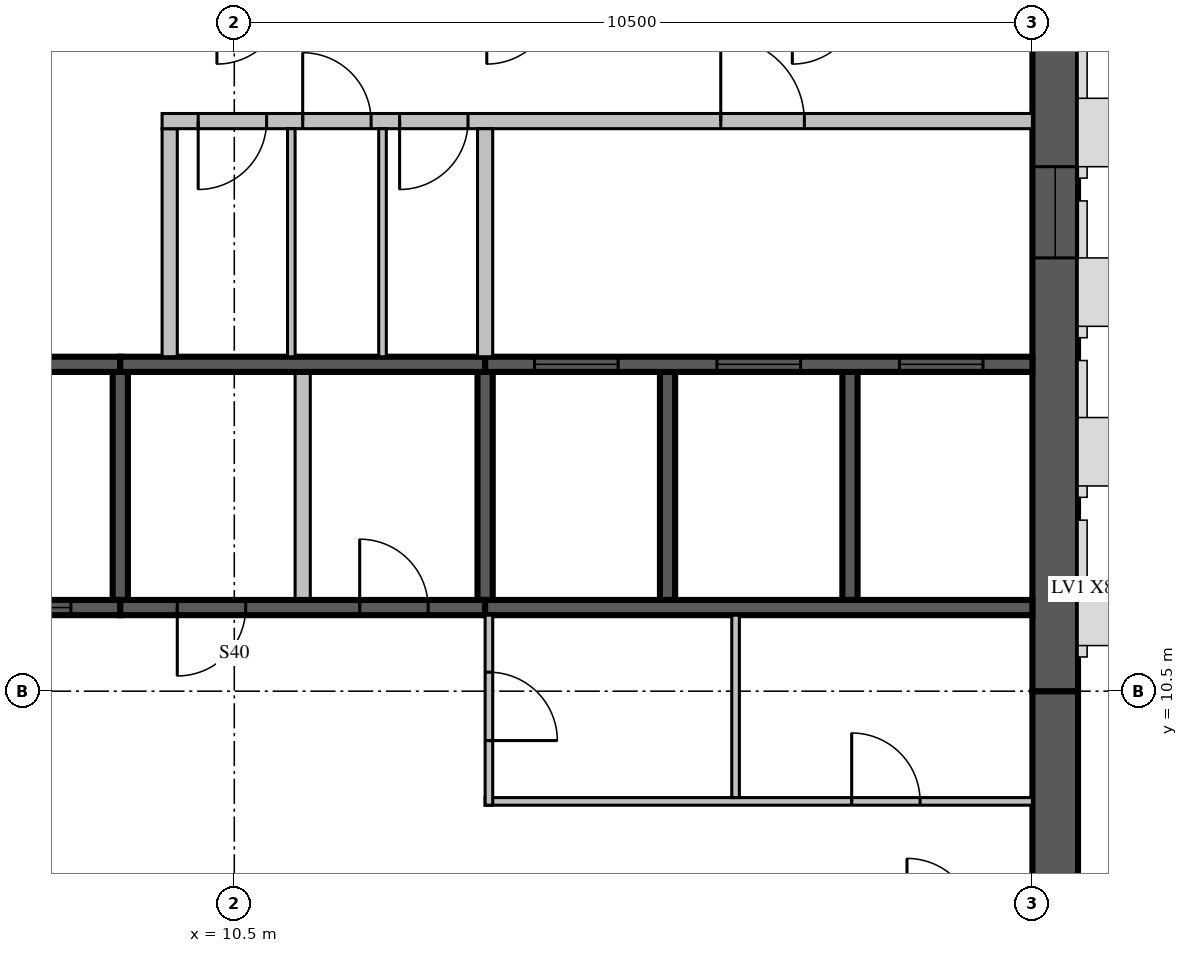
"""IFC4 building model, lengths in metres.
Left out: names, types, materials, properties, quantities, classifications, styles, units other than length and angle.
Written with IfcOpenShell. Run it as: python <this file> out.ifc"""

import sys

from ifc_helpers import new_model, si_unit, direction, frame, frame_2d, origin, place, context, subcontext, project, spatial, rectangle, extrude, source, transform, mapped, element, fill, save


model = new_model("IFC4")
c1 = context("Model", 3, precision=1e-05, world=origin(), true_north=direction((0.0, 1.0)))
c2 = subcontext(c1, "Body", "Model", "MODEL_VIEW")
j1 = project(units=[si_unit("LENGTHUNIT", "METRE"), si_unit("PLANEANGLEUNIT", "RADIAN")], contexts=[c1])
p1 = place(None, origin())
s1 = spatial("IfcSite", under=j1, at=p1, CompositionType="ELEMENT")
p2 = place(p1, origin())
s2 = spatial("IfcBuilding", under=s1, at=p2, CompositionType="ELEMENT")
p3 = place(p2, frame((0.0, 0.0, 298.5)))
s3 = spatial("IfcBuildingStorey", under=s2, at=p3, CompositionType="ELEMENT", Elevation=298.5)
m1 = source(origin(), c2, "Body", "SweptSolid", [
    extrude(rectangle(XDim=6.3, YDim=0.6, at=frame_2d((3.15, 0.0))), origin(), (0.0, 0.0, 1.0), 3.5),
])
p4 = place(p3, frame((21.3, 4.2, 0.0), z_axis=(0.0, 0.0, 1.0), x_axis=(0.0, 1.0, 0.0)))
e1 = element("IfcWall", 1, at=p4, inside=s3, PredefinedType="SHEAR", context=c2, shape_type="MappedRepresentation", body=[
    mapped(m1, transform((0.0, 0.0, 0.0), scale=1.0)),
])
m2 = source(origin(), c2, "Body", "SweptSolid", [
    extrude(rectangle(XDim=10.5, YDim=0.6, at=frame_2d((5.25, 0.0))), origin(), (0.0, 0.0, 1.0), 3.5),
])
p5 = place(p3, frame((21.3, 10.5, 0.0), z_axis=(0.0, 0.0, 1.0), x_axis=(0.0, 1.0, 0.0)))
e2 = element("IfcWall", 2, at=p5, inside=s3, PredefinedType="SHEAR", context=c2, shape_type="MappedRepresentation", body=[
    mapped(m2, transform((0.0, 0.0, 0.0), scale=1.0)),
])
m3 = source(origin(), c2, "Body", "SweptSolid", [
    extrude(rectangle(XDim=1.2, YDim=2.4, at=frame_2d((0.6, 1.2))), frame((0.0, 0.31, 0.0), z_axis=(0.0, -1.0, 0.0), x_axis=(1.0, 0.0, 0.0)), (0.0, 0.0, 1.0), 0.62),
])
p6 = place(p5, frame((5.7, 0.0, 0.6)))
e3 = element("IfcOpeningElement", 3, at=p6, cuts=e2, PredefinedType="OPENING", context=c2, shape_type="MappedRepresentation", body=[
    mapped(m3, transform((0.0, 0.0, 0.0), scale=1.0)),
])
m4 = source(origin(), c2, "Body", "SweptSolid", [
    extrude(rectangle(XDim=3.0, YDim=0.2, at=frame_2d((1.5, 0.0))), origin(), (0.0, 0.0, 1.0), 3.1),
])
for number, where, z_axis, x_axis in (
    (4, (9.0, 11.7, 0.0), (0.0, 0.0, 1.0), (0.0, 1.0, 0.0)),
    (5, (13.8, 11.7, 0.0), (0.0, 0.0, 1.0), (0.0, 1.0, 0.0)),
):
    element("IfcWall", number, at=place(p3, frame(where, z_axis=z_axis, x_axis=x_axis)), inside=s3, PredefinedType="SOLIDWALL", context=c2, shape_type="MappedRepresentation", body=[
        mapped(m4, transform((0.0, 0.0, 0.0), scale=1.0)),
    ])
m5 = source(origin(), c2, "Body", "SweptSolid", [
    extrude(rectangle(XDim=3.0, YDim=0.2, at=frame_2d((1.5, 0.0))), origin(), (0.0, 0.0, 1.0), 3.5),
])
for number, where, z_axis, x_axis in (
    (6, (16.2, 11.7, 0.0), (0.0, 0.0, 1.0), (0.0, 1.0, 0.0)),
    (7, (18.6, 11.7, 0.0), (0.0, 0.0, 1.0), (0.0, 1.0, 0.0)),
):
    element("IfcWall", number, at=place(p3, frame(where, z_axis=z_axis, x_axis=x_axis)), inside=s3, PredefinedType="SOLIDWALL", context=c2, shape_type="MappedRepresentation", body=[
        mapped(m5, transform((0.0, 0.0, 0.0), scale=1.0)),
    ])
m6 = source(origin(), c2, "Body", "SweptSolid", [
    extrude(rectangle(XDim=3.0, YDim=0.2, at=frame_2d((1.5, 0.0))), origin(), (0.0, 0.0, 1.0), 3.1),
])
p7 = place(p3, frame((11.4, 11.7, 0.0), z_axis=(0.0, 0.0, 1.0), x_axis=(0.0, 1.0, 0.0)))
e8 = element("IfcWall", 8, at=p7, inside=s3, PredefinedType="PARTITIONING", context=c2, shape_type="MappedRepresentation", body=[
    mapped(m6, transform((0.0, 0.0, 0.0), scale=1.0)),
])
m7 = source(origin(), c2, "Body", "SweptSolid", [
    extrude(rectangle(XDim=4.8, YDim=0.2, at=frame_2d((2.4, 0.0))), origin(), (0.0, 0.0, 1.0), 3.5),
])
p8 = place(p3, frame((4.2, 11.6, 0.0), z_axis=(0.0, 0.0, 1.0), x_axis=(1.0, 0.0, 0.0)))
e9 = element("IfcWall", 9, at=p8, inside=s3, PredefinedType="SOLIDWALL", context=c2, shape_type="MappedRepresentation", body=[
    mapped(m7, transform((0.0, 0.0, 0.0), scale=1.0)),
])
m8 = source(origin(), c2, "Body", "SweptSolid", [
    extrude(rectangle(XDim=1.1, YDim=2.1, at=frame_2d((0.55, 1.05))), frame((0.0, 0.11, 0.0), z_axis=(0.0, -1.0, 0.0), x_axis=(1.0, 0.0, 0.0)), (0.0, 0.0, 1.0), 0.22),
])
p9 = place(p8, frame((0.65, 0.0, 0.0)))
e10 = element("IfcOpeningElement", 10, at=p9, cuts=e9, PredefinedType="OPENING", context=c2, shape_type="MappedRepresentation", body=[
    mapped(m8, transform((0.0, 0.0, 0.0), scale=1.0)),
])
p10 = place(p8, frame((3.05, 0.0, 0.0)))
e11 = element("IfcOpeningElement", 11, at=p10, cuts=e9, PredefinedType="OPENING", context=c2, shape_type="MappedRepresentation", body=[
    mapped(m8, transform((0.0, 0.0, 0.0), scale=1.0)),
])
m9 = source(origin(), c2, "Body", "SweptSolid", [
    extrude(rectangle(XDim=4.8, YDim=0.2, at=frame_2d((2.4, 0.0))), origin(), (0.0, 0.0, 1.0), 3.1),
])
p11 = place(p3, frame((9.0, 11.6, 0.0), z_axis=(0.0, 0.0, 1.0), x_axis=(1.0, 0.0, 0.0)))
e12 = element("IfcWall", 12, at=p11, inside=s3, PredefinedType="SOLIDWALL", context=c2, shape_type="MappedRepresentation", body=[
    mapped(m9, transform((0.0, 0.0, 0.0), scale=1.0)),
])
m10 = source(origin(), c2, "Body", "SweptSolid", [
    extrude(rectangle(XDim=0.9, YDim=2.1, at=frame_2d((0.45, 1.05))), frame((0.0, 0.11, 0.0), z_axis=(0.0, -1.0, 0.0), x_axis=(1.0, 0.0, 0.0)), (0.0, 0.0, 1.0), 0.22),
])
p12 = place(p11, frame((0.75, 0.0, 0.0)))
e13 = element("IfcOpeningElement", 13, at=p12, cuts=e12, PredefinedType="OPENING", context=c2, shape_type="MappedRepresentation", body=[
    mapped(m10, transform((0.0, 0.0, 0.0), scale=1.0)),
])
p13 = place(p11, frame((3.15, 0.0, 0.0)))
e14 = element("IfcOpeningElement", 14, at=p13, cuts=e12, PredefinedType="OPENING", context=c2, shape_type="MappedRepresentation", body=[
    mapped(m10, transform((0.0, 0.0, 0.0), scale=1.0)),
])
m11 = source(origin(), c2, "Body", "SweptSolid", [
    extrude(rectangle(XDim=7.2, YDim=0.2, at=frame_2d((3.6, 0.0))), origin(), (0.0, 0.0, 1.0), 3.5),
])
p14 = place(p3, frame((13.8, 11.6, 0.0), z_axis=(0.0, 0.0, 1.0), x_axis=(1.0, 0.0, 0.0)))
e15 = element("IfcWall", 15, at=p14, inside=s3, PredefinedType="SOLIDWALL", context=c2, shape_type="MappedRepresentation", body=[
    mapped(m11, transform((0.0, 0.0, 0.0), scale=1.0)),
])
p15 = place(p3, frame((4.2, 14.8, 0.0), z_axis=(0.0, 0.0, 1.0), x_axis=(1.0, 0.0, 0.0)))
e16 = element("IfcWall", 16, at=p15, inside=s3, PredefinedType="SOLIDWALL", context=c2, shape_type="MappedRepresentation", body=[
    mapped(m7, transform((0.0, 0.0, 0.0), scale=1.0)),
])
p16 = place(p3, frame((9.0, 14.8, 0.0), z_axis=(0.0, 0.0, 1.0), x_axis=(1.0, 0.0, 0.0)))
e17 = element("IfcWall", 17, at=p16, inside=s3, PredefinedType="SOLIDWALL", context=c2, shape_type="MappedRepresentation", body=[
    mapped(m9, transform((0.0, 0.0, 0.0), scale=1.0)),
])
p17 = place(p3, frame((13.8, 14.8, 0.0), z_axis=(0.0, 0.0, 1.0), x_axis=(1.0, 0.0, 0.0)))
e18 = element("IfcWall", 18, at=p17, inside=s3, PredefinedType="SOLIDWALL", context=c2, shape_type="MappedRepresentation", body=[
    mapped(m11, transform((0.0, 0.0, 0.0), scale=1.0)),
])
p18 = place(p17, frame((0.65, 0.0, 0.0)))
e19 = element("IfcOpeningElement", 19, at=p18, cuts=e18, PredefinedType="OPENING", context=c2, shape_type="MappedRepresentation", body=[
    mapped(m8, transform((0.0, 0.0, 0.0), scale=1.0)),
])
p19 = place(p17, frame((3.05, 0.0, 0.0)))
e20 = element("IfcOpeningElement", 20, at=p19, cuts=e18, PredefinedType="OPENING", context=c2, shape_type="MappedRepresentation", body=[
    mapped(m8, transform((0.0, 0.0, 0.0), scale=1.0)),
])
p20 = place(p17, frame((5.45, 0.0, 0.0)))
e21 = element("IfcOpeningElement", 21, at=p20, cuts=e18, PredefinedType="OPENING", context=c2, shape_type="MappedRepresentation", body=[
    mapped(m8, transform((0.0, 0.0, 0.0), scale=1.0)),
])
p21 = place(p3, frame((9.65, 14.9, 0.0), z_axis=(0.0, 0.0, 1.0), x_axis=(0.0, 1.0, 0.0)))
e22 = element("IfcWall", 22, at=p21, inside=s3, PredefinedType="PARTITIONING", context=c2, shape_type="MappedRepresentation", body=[
    mapped(m6, transform((0.0, 0.0, 0.0), scale=1.0)),
])
m12 = source(origin(), c2, "Body", "SweptSolid", [
    extrude(rectangle(XDim=11.45, YDim=0.2, at=frame_2d((5.725, 0.0))), origin(), (0.0, 0.0, 1.0), 3.1),
])
p22 = place(p3, frame((9.55, 18.0, 0.0), z_axis=(0.0, 0.0, 1.0), x_axis=(1.0, 0.0, 0.0)))
e23 = element("IfcWall", 23, at=p22, inside=s3, PredefinedType="PARTITIONING", context=c2, shape_type="MappedRepresentation", body=[
    mapped(m12, transform((0.0, 0.0, 0.0), scale=1.0)),
])
p23 = place(p22, frame((0.475, 0.0, 0.0)))
e24 = element("IfcOpeningElement", 24, at=p23, cuts=e23, PredefinedType="OPENING", context=c2, shape_type="MappedRepresentation", body=[
    mapped(m10, transform((0.0, 0.0, 0.0), scale=1.0)),
])
p24 = place(p22, frame((1.85, 0.0, 0.0)))
e25 = element("IfcOpeningElement", 25, at=p24, cuts=e23, PredefinedType="OPENING", context=c2, shape_type="MappedRepresentation", body=[
    mapped(m10, transform((0.0, 0.0, 0.0), scale=1.0)),
])
p25 = place(p22, frame((3.125, 0.0, 0.0)))
e26 = element("IfcOpeningElement", 26, at=p25, cuts=e23, PredefinedType="OPENING", context=c2, shape_type="MappedRepresentation", body=[
    mapped(m10, transform((0.0, 0.0, 0.0), scale=1.0)),
])
p26 = place(p22, frame((7.35, 0.0, 0.0)))
e27 = element("IfcOpeningElement", 27, at=p26, cuts=e23, PredefinedType="OPENING", context=c2, shape_type="MappedRepresentation", body=[
    mapped(m8, transform((0.0, 0.0, 0.0), scale=1.0)),
])
m13 = source(origin(), c2, "Body", "SweptSolid", [
    extrude(rectangle(XDim=7.2, YDim=0.1, at=frame_2d((3.6, 0.0))), origin(), (0.0, 0.0, 1.0), 3.1),
])
p27 = place(p3, frame((13.8, 9.05, 0.0), z_axis=(0.0, 0.0, 1.0), x_axis=(1.0, 0.0, 0.0)))
e28 = element("IfcWall", 28, at=p27, inside=s3, PredefinedType="PARTITIONING", context=c2, shape_type="MappedRepresentation", body=[
    mapped(m13, transform((0.0, 0.0, 0.0), scale=1.0)),
])
m14 = source(origin(), c2, "Body", "SweptSolid", [
    extrude(rectangle(XDim=0.9, YDim=2.1, at=frame_2d((0.45, 1.05))), frame((0.0, 0.06, 0.0), z_axis=(0.0, -1.0, 0.0), x_axis=(1.0, 0.0, 0.0)), (0.0, 0.0, 1.0), 0.12),
])
p28 = place(p27, frame((4.822, 0.0, 0.0)))
e29 = element("IfcOpeningElement", 29, at=p28, cuts=e28, PredefinedType="OPENING", context=c2, shape_type="MappedRepresentation", body=[
    mapped(m14, transform((0.0, 0.0, 0.0), scale=1.0)),
])
m15 = source(origin(), c2, "Body", "SweptSolid", [
    extrude(rectangle(XDim=2.5, YDim=0.1, at=frame_2d((1.25, 0.0))), origin(), (0.0, 0.0, 1.0), 3.1),
])
p29 = place(p3, frame((13.85, 9.0, 0.0), z_axis=(0.0, 0.0, 1.0), x_axis=(0.0, 1.0, 0.0)))
e30 = element("IfcWall", 30, at=p29, inside=s3, PredefinedType="PARTITIONING", context=c2, shape_type="MappedRepresentation", body=[
    mapped(m15, transform((0.0, 0.0, 0.0), scale=1.0)),
])
p30 = place(p29, frame((0.85, 0.0, 0.0)))
e31 = element("IfcOpeningElement", 31, at=p30, cuts=e30, PredefinedType="OPENING", context=c2, shape_type="MappedRepresentation", body=[
    mapped(m14, transform((0.0, 0.0, 0.0), scale=1.0)),
])
m16 = source(origin(), c2, "Body", "SweptSolid", [
    extrude(rectangle(XDim=2.4, YDim=0.1, at=frame_2d((1.2, 0.0))), origin(), (0.0, 0.0, 1.0), 3.1),
])
p31 = place(p3, frame((17.095, 9.1, 0.0), z_axis=(0.0, 0.0, 1.0), x_axis=(0.0, 1.0, 0.0)))
e32 = element("IfcWall", 32, at=p31, inside=s3, PredefinedType="PARTITIONING", context=c2, shape_type="MappedRepresentation", body=[
    mapped(m16, transform((0.0, 0.0, 0.0), scale=1.0)),
])
p32 = place(p3, frame((13.8, 14.9, 0.0), z_axis=(0.0, 0.0, 1.0), x_axis=(0.0, 1.0, 0.0)))
e33 = element("IfcWall", 33, at=p32, inside=s3, PredefinedType="PARTITIONING", context=c2, shape_type="MappedRepresentation", body=[
    mapped(m6, transform((0.0, 0.0, 0.0), scale=1.0)),
])
m17 = source(origin(), c2, "Body", "SweptSolid", [
    extrude(rectangle(XDim=3.0, YDim=0.1, at=frame_2d((1.5, 0.0))), origin(), (0.0, 0.0, 1.0), 3.1),
])
for number, where, z_axis, x_axis in (
    (34, (11.25, 14.9, 0.0), (0.0, 0.0, 1.0), (0.0, 1.0, 0.0)),
    (35, (12.45, 14.9, 0.0), (0.0, 0.0, 1.0), (0.0, 1.0, 0.0)),
):
    element("IfcWall", number, at=place(p3, frame(where, z_axis=z_axis, x_axis=x_axis)), inside=s3, PredefinedType="PARTITIONING", context=c2, shape_type="MappedRepresentation", body=[
        mapped(m17, transform((0.0, 0.0, 0.0), scale=1.0)),
    ])
m18 = source(origin(), c2, "Body", "SweptSolid", [
    extrude(rectangle(XDim=1.1, YDim=2.1, at=frame_2d((0.55, 1.05))), frame((0.0, 0.025, 0.0), z_axis=(0.0, -1.0, 0.0), x_axis=(1.0, 0.0, 0.0)), (0.0, 0.0, 1.0), 0.05),
])
p33 = place(p10, origin())
e36 = element("IfcDoor", 36, at=p33, inside=s3, OperationType="SLIDING_TO_LEFT", PredefinedType="DOOR", context=c2, shape_type="MappedRepresentation", body=[
    mapped(m18, transform((0.0, 0.0, 0.0), scale=1.0)),
])
fill(e11, e36)
m19 = source(origin(), c2, "Body", "SweptSolid", [
    extrude(rectangle(XDim=0.9, YDim=2.1, at=frame_2d((0.45, 1.05))), frame((0.0, 0.025, 0.0), z_axis=(0.0, -1.0, 0.0), x_axis=(1.0, 0.0, 0.0)), (0.0, 0.0, 1.0), 0.05),
])
p34 = place(p12, origin())
e37 = element("IfcDoor", 37, at=p34, inside=s3, OperationType="SINGLE_SWING_RIGHT", PredefinedType="DOOR", context=c2, shape_type="MappedRepresentation", body=[
    mapped(m19, transform((0.0, 0.0, 0.0), scale=1.0)),
])
fill(e13, e37)
p35 = place(p13, origin())
e38 = element("IfcDoor", 38, at=p35, inside=s3, OperationType="SINGLE_SWING_LEFT", PredefinedType="DOOR", context=c2, shape_type="MappedRepresentation", body=[
    mapped(m19, transform((0.0, 0.0, 0.0), scale=1.0)),
])
fill(e14, e38)
p36 = place(p18, origin())
e39 = element("IfcDoor", 39, at=p36, inside=s3, OperationType="SLIDING_TO_LEFT", PredefinedType="DOOR", context=c2, shape_type="MappedRepresentation", body=[
    mapped(m18, transform((0.0, 0.0, 0.0), scale=1.0)),
])
fill(e19, e39)
p37 = place(p19, origin())
e40 = element("IfcDoor", 40, at=p37, inside=s3, OperationType="SLIDING_TO_LEFT", PredefinedType="DOOR", context=c2, shape_type="MappedRepresentation", body=[
    mapped(m18, transform((0.0, 0.0, 0.0), scale=1.0)),
])
fill(e20, e40)
p38 = place(p20, origin())
e41 = element("IfcDoor", 41, at=p38, inside=s3, OperationType="SLIDING_TO_LEFT", PredefinedType="DOOR", context=c2, shape_type="MappedRepresentation", body=[
    mapped(m18, transform((0.0, 0.0, 0.0), scale=1.0)),
])
fill(e21, e41)
p39 = place(p23, origin())
e42 = element("IfcDoor", 42, at=p39, inside=s3, OperationType="SINGLE_SWING_RIGHT", PredefinedType="DOOR", context=c2, shape_type="MappedRepresentation", body=[
    mapped(m19, transform((0.0, 0.0, 0.0), scale=1.0)),
])
fill(e24, e42)
p40 = place(p24, origin())
e43 = element("IfcDoor", 43, at=p40, inside=s3, OperationType="SINGLE_SWING_LEFT", PredefinedType="DOOR", context=c2, shape_type="MappedRepresentation", body=[
    mapped(m19, transform((0.0, 0.0, 0.0), scale=1.0)),
])
fill(e25, e43)
p41 = place(p25, origin())
e44 = element("IfcDoor", 44, at=p41, inside=s3, OperationType="SINGLE_SWING_RIGHT", PredefinedType="DOOR", context=c2, shape_type="MappedRepresentation", body=[
    mapped(m19, transform((0.0, 0.0, 0.0), scale=1.0)),
])
fill(e26, e44)
p42 = place(p26, origin())
e45 = element("IfcDoor", 45, at=p42, inside=s3, OperationType="SINGLE_SWING_LEFT", PredefinedType="DOOR", context=c2, shape_type="MappedRepresentation", body=[
    mapped(m18, transform((0.0, 0.0, 0.0), scale=1.0)),
])
fill(e27, e45)
p43 = place(p28, origin())
e46 = element("IfcDoor", 46, at=p43, inside=s3, OperationType="SINGLE_SWING_LEFT", PredefinedType="DOOR", context=c2, shape_type="MappedRepresentation", body=[
    mapped(m19, transform((0.0, 0.0, 0.0), scale=1.0)),
])
fill(e29, e46)
p44 = place(p30, origin())
e47 = element("IfcDoor", 47, at=p44, inside=s3, OperationType="SINGLE_SWING_RIGHT", PredefinedType="DOOR", context=c2, shape_type="MappedRepresentation", body=[
    mapped(m19, transform((0.0, 0.0, 0.0), scale=1.0)),
])
fill(e31, e47)
m20 = source(origin(), c2, "Body", "SweptSolid", [
    extrude(rectangle(XDim=1.2, YDim=2.4, at=frame_2d((0.6, 1.2))), frame((0.0, 0.03, 0.0), z_axis=(0.0, -1.0, 0.0), x_axis=(1.0, 0.0, 0.0)), (0.0, 0.0, 1.0), 0.06),
])
p45 = place(p6, origin())
e48 = element("IfcWindow", 48, at=p45, inside=s3, PartitioningType="SINGLE_PANEL", PredefinedType="WINDOW", context=c2, shape_type="MappedRepresentation", body=[
    mapped(m20, transform((0.0, 0.0, 0.0), scale=1.0)),
])
fill(e3, e48)
save(model, sys.argv[1])
